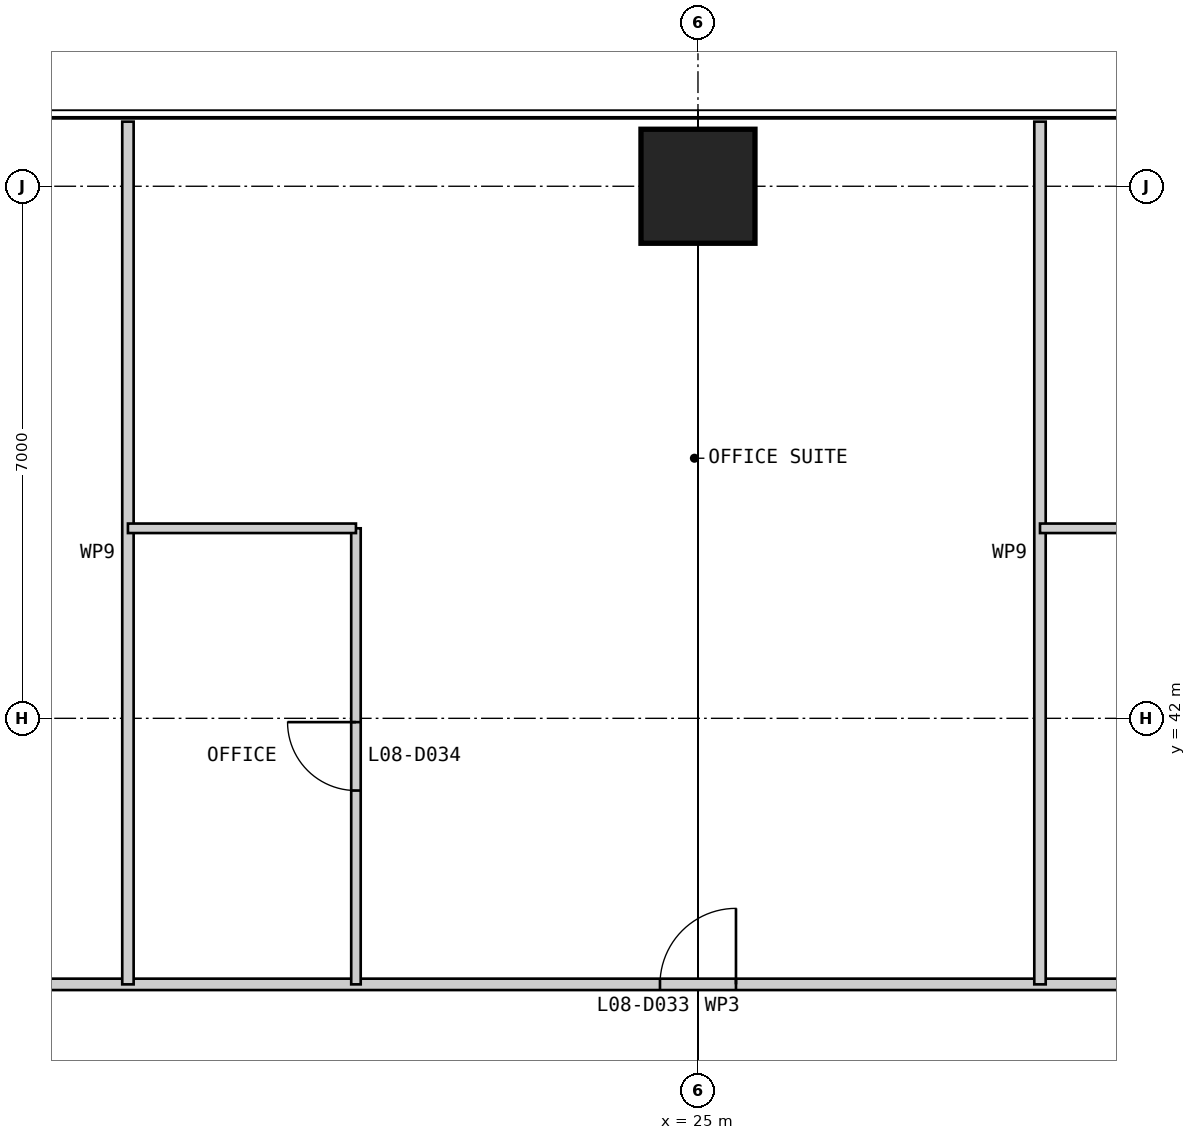
"""IFC4 building model, lengths in metres.
Left out: names, types, materials, properties, quantities, classifications, styles, units other than length and angle.
Written with IfcOpenShell. Run it as: python <this file> out.ifc"""

import sys

from ifc_helpers import new_model, si_unit, direction, frame, frame_2d, origin, origin_2d, place, context, subcontext, project, spatial, rectangle, extrude, element, fill, save


model = new_model("IFC4")
c1 = context("Model", 3, precision=1e-05, world=origin(), true_north=direction((0.0, 1.0)))
c2 = subcontext(c1, "Body", "Model", "MODEL_VIEW")
j1 = project(units=[si_unit("LENGTHUNIT", "METRE"), si_unit("PLANEANGLEUNIT", "RADIAN")], contexts=[c1])
p1 = place(None, origin())
s1 = spatial("IfcSite", under=j1, at=p1, CompositionType="ELEMENT")
p2 = place(p1, origin())
s2 = spatial("IfcBuilding", under=s1, at=p2, CompositionType="ELEMENT")
p3 = place(p2, frame((0.0, 0.0, 39.0)))
s3 = spatial("IfcBuildingStorey", under=s2, at=p3, CompositionType="ELEMENT", Elevation=39.0)
p4 = place(p3, frame((25.0, 49.0, 0.0), z_axis=(0.0, 0.0, 1.0), x_axis=(1.0, 0.0, 0.0)))
e1 = element("IfcColumn", 1, at=p4, inside=s3, PredefinedType="COLUMN", context=c2, shape_type="SweptSolid", body=[
    extrude(rectangle(XDim=1.5, YDim=1.5, at=origin_2d()), origin(), (0.0, 0.0, 1.0), 4.0),
])
p5 = place(p3, frame((38.5, 38.5, 0.0), z_axis=(0.0, 0.0, 1.0), x_axis=(-1.0, 0.0, 0.0)))
e2 = element("IfcWall", 2, at=p5, inside=s3, PredefinedType="PARTITIONING", context=c2, shape_type="SweptSolid", body=[
    extrude(rectangle(XDim=27.0, YDim=0.15, at=frame_2d((13.5, 0.0))), origin(), (0.0, 0.0, 1.0), 3.85),
])
p6 = place(p5, frame((2.5, 0.0, 0.0)))
e3 = element("IfcOpeningElement", 3, at=p6, cuts=e2, PredefinedType="OPENING", context=c2, shape_type="SweptSolid", body=[
    extrude(rectangle(XDim=1.0, YDim=2.2, at=frame_2d((0.5, 1.1))), frame((0.0, 0.085, 0.0), z_axis=(0.0, -1.0, 0.0), x_axis=(1.0, 0.0, 0.0)), (0.0, 0.0, 1.0), 0.17),
])
p7 = place(p5, frame((13.0, 0.0, 0.0)))
e4 = element("IfcOpeningElement", 4, at=p7, cuts=e2, PredefinedType="OPENING", context=c2, shape_type="SweptSolid", body=[
    extrude(rectangle(XDim=1.0, YDim=2.2, at=frame_2d((0.5, 1.1))), frame((0.0, 0.085, 0.0), z_axis=(0.0, -1.0, 0.0), x_axis=(1.0, 0.0, 0.0)), (0.0, 0.0, 1.0), 0.17),
])
p8 = place(p5, frame((23.5, 0.0, 0.0)))
e5 = element("IfcOpeningElement", 5, at=p8, cuts=e2, PredefinedType="OPENING", context=c2, shape_type="SweptSolid", body=[
    extrude(rectangle(XDim=1.0, YDim=2.2, at=frame_2d((0.5, 1.1))), frame((0.0, 0.085, 0.0), z_axis=(0.0, -1.0, 0.0), x_axis=(1.0, 0.0, 0.0)), (0.0, 0.0, 1.0), 0.17),
])
p9 = place(p3, frame((29.5, 49.85, 0.0), z_axis=(0.0, 0.0, 1.0), x_axis=(0.0, -1.0, 0.0)))
e6 = element("IfcWall", 6, at=p9, inside=s3, PredefinedType="PARTITIONING", context=c2, shape_type="SweptSolid", body=[
    extrude(rectangle(XDim=11.35, YDim=0.15, at=frame_2d((5.675, 0.0))), origin(), (0.0, 0.0, 1.0), 3.85),
])
p10 = place(p3, frame((20.5, 44.5, 0.0), z_axis=(0.0, 0.0, 1.0), x_axis=(0.0, -1.0, 0.0)))
e7 = element("IfcWall", 7, at=p10, inside=s3, PredefinedType="PARTITIONING", context=c2, shape_type="SweptSolid", body=[
    extrude(rectangle(XDim=6.0, YDim=0.125, at=frame_2d((3.0, 0.0))), origin(), (0.0, 0.0, 1.0), 3.85),
])
p11 = place(p10, frame((2.55, 0.0, 0.0)))
e8 = element("IfcOpeningElement", 8, at=p11, cuts=e7, PredefinedType="OPENING", context=c2, shape_type="SweptSolid", body=[
    extrude(rectangle(XDim=0.9, YDim=2.2, at=frame_2d((0.45, 1.1))), frame((0.0, 0.073, 0.0), z_axis=(0.0, -1.0, 0.0), x_axis=(1.0, 0.0, 0.0)), (0.0, 0.0, 1.0), 0.145),
])
p12 = place(p3, frame((17.5, 49.85, 0.0), z_axis=(0.0, 0.0, 1.0), x_axis=(0.0, -1.0, 0.0)))
e9 = element("IfcWall", 9, at=p12, inside=s3, PredefinedType="PARTITIONING", context=c2, shape_type="SweptSolid", body=[
    extrude(rectangle(XDim=11.35, YDim=0.15, at=frame_2d((5.675, 0.0))), origin(), (0.0, 0.0, 1.0), 3.85),
])
p13 = place(p3, frame((35.5, 44.5, 0.0), z_axis=(0.0, 0.0, 1.0), x_axis=(-1.0, 0.0, 0.0)))
e10 = element("IfcWall", 10, at=p13, inside=s3, PredefinedType="PARTITIONING", context=c2, shape_type="SweptSolid", body=[
    extrude(rectangle(XDim=6.0, YDim=0.125, at=frame_2d((3.0, 0.0))), origin(), (0.0, 0.0, 1.0), 3.85),
])
p14 = place(p3, frame((20.5, 44.5, 0.0), z_axis=(0.0, 0.0, 1.0), x_axis=(-1.0, 0.0, 0.0)))
e11 = element("IfcWall", 11, at=p14, inside=s3, PredefinedType="PARTITIONING", context=c2, shape_type="SweptSolid", body=[
    extrude(rectangle(XDim=3.0, YDim=0.125, at=frame_2d((1.5, 0.0))), origin(), (0.0, 0.0, 1.0), 3.85),
])
p15 = place(p7, frame((1.0, 0.0, 0.0), z_axis=(0.0, 0.0, 1.0), x_axis=(-1.0, 0.0, 0.0)))
e12 = element("IfcDoor", 12, at=p15, inside=s3, OperationType="SINGLE_SWING_RIGHT", PredefinedType="DOOR", context=c2, shape_type="SweptSolid", body=[
    extrude(rectangle(XDim=1.0, YDim=2.2, at=frame_2d((0.5, 1.1))), frame((0.0, 0.025, 0.0), z_axis=(0.0, -1.0, 0.0), x_axis=(1.0, 0.0, 0.0)), (0.0, 0.0, 1.0), 0.05),
])
fill(e4, e12)
p16 = place(p11, frame((0.9, 0.0, 0.0), z_axis=(0.0, 0.0, 1.0), x_axis=(-1.0, 0.0, 0.0)))
e13 = element("IfcDoor", 13, at=p16, inside=s3, OperationType="SINGLE_SWING_RIGHT", PredefinedType="DOOR", context=c2, shape_type="SweptSolid", body=[
    extrude(rectangle(XDim=0.9, YDim=2.2, at=frame_2d((0.45, 1.1))), frame((0.0, 0.025, 0.0), z_axis=(0.0, -1.0, 0.0), x_axis=(1.0, 0.0, 0.0)), (0.0, 0.0, 1.0), 0.05),
])
fill(e8, e13)
save(model, sys.argv[1])
